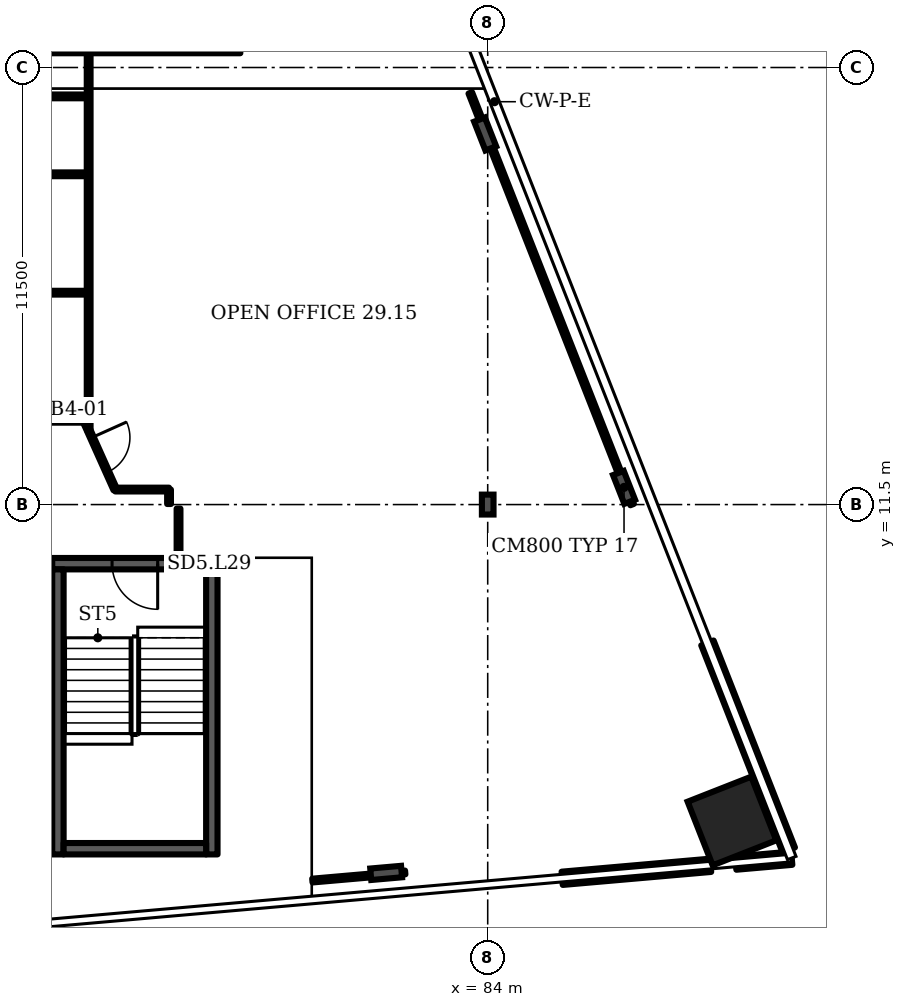
"""IFC4 building model, lengths in metres.
Left out: names, types, materials, properties, quantities, classifications, styles, units other than length and angle.
Written with IfcOpenShell. Run it as: python <this file> out.ifc"""

import sys

from ifc_helpers import new_model, si_unit, direction, frame, frame_2d, origin, origin_2d, place, context, subcontext, project, spatial, rectangle, i_section, extrude, element, fill, save


model = new_model("IFC4")
c1 = context("Model", 3, precision=1e-05, world=origin(), true_north=direction((0.0, 1.0)))
c2 = subcontext(c1, "Body", "Model", "MODEL_VIEW")
j1 = project(units=[si_unit("LENGTHUNIT", "METRE"), si_unit("PLANEANGLEUNIT", "RADIAN")], contexts=[c1])
p1 = place(None, origin())
s1 = spatial("IfcSite", under=j1, at=p1, CompositionType="ELEMENT")
p2 = place(p1, origin())
s2 = spatial("IfcBuilding", under=s1, at=p2, CompositionType="ELEMENT")
p3 = place(p2, frame((0.0, 0.0, 125.5)))
s3 = spatial("IfcBuildingStorey", under=s2, at=p3, CompositionType="ELEMENT", Elevation=125.5)
p4 = place(p3, frame((90.427, 3.174, 0.0), z_axis=(0.0, 0.0, 1.0), x_axis=(-0.365778, 0.930702, 0.0)))
e1 = element("IfcColumn", 1, at=p4, inside=s3, PredefinedType="COLUMN", context=c2, shape_type="SweptSolid", body=[
    extrude(rectangle(XDim=1.8, YDim=1.8, at=origin_2d()), origin(), (0.0, 0.0, 1.0), 3.6),
])
for number, where, z_axis, x_axis in (
    (2, (81.328, 1.808, 0.0), (0.0, 0.0, 1.0), (0.087, -0.996, 0.0)),
    (3, (87.587, 11.952, 0.0), (0.0, 0.0, 1.0), (0.931, 0.366, 0.0)),
    (4, (83.933, 21.251, 0.0), (0.0, 0.0, 1.0), (0.931, 0.366, 0.0)),
):
    element("IfcColumn", number, at=place(p3, frame(where, z_axis=z_axis, x_axis=x_axis)), inside=s3, PredefinedType="COLUMN", context=c2, shape_type="SweptSolid", body=[
        extrude(i_section(OverallWidth=0.303, OverallDepth=0.814, WebThickness=0.021, FlangeThickness=0.04, FilletRadius=0.03, at=origin_2d()), origin(), (0.0, 0.0, 1.0), 3.6),
    ])
p5 = place(p3, frame((84.0, 11.5, 0.0), z_axis=(0.0, 0.0, 1.0), x_axis=(1.0, 0.0, 0.0)))
e5 = element("IfcColumn", 5, at=p5, inside=s3, PredefinedType="COLUMN", context=c2, shape_type="SweptSolid", body=[
    extrude(i_section(OverallWidth=0.306, OverallDepth=0.524, WebThickness=0.021, FlangeThickness=0.04, FilletRadius=0.027, at=origin_2d()), origin(), (0.0, 0.0, 1.0), 3.6),
])
p6 = place(p3, frame((85.959, 1.667, 0.0), z_axis=(0.0, 0.0, 1.0), x_axis=(0.996194, 0.087167, 0.0)))
e6 = element("IfcWall", 6, at=p6, inside=s3, PredefinedType="SOLIDWALL", context=c2, shape_type="SweptSolid", body=[
    extrude(rectangle(XDim=3.921, YDim=0.35, at=frame_2d((1.96, 0.0))), origin(), (0.0, 0.0, 1.0), 1.0),
])
p7 = place(p3, frame((90.527, 2.066, 0.0), z_axis=(0.0, 0.0, 1.0), x_axis=(0.996198, 0.087157, 0.0)))
e7 = element("IfcWall", 7, at=p7, inside=s3, PredefinedType="SOLIDWALL", context=c2, shape_type="SweptSolid", body=[
    extrude(rectangle(XDim=1.479, YDim=0.35, at=frame_2d((0.74, 0.0))), origin(), (0.0, 0.0, 1.0), 1.0),
])
p8 = place(p3, frame((91.921, 2.414, 0.0), z_axis=(0.0, 0.0, 1.0), x_axis=(-0.36578, 0.930701, 0.0)))
e8 = element("IfcWall", 8, at=p8, inside=s3, PredefinedType="SOLIDWALL", context=c2, shape_type="SweptSolid", body=[
    extrude(rectangle(XDim=5.852, YDim=0.35, at=frame_2d((2.926, 0.0))), origin(), (0.0, 0.0, 1.0), 1.0),
])
p9 = place(p3, frame((72.541, 9.945, 0.0), z_axis=(0.0, 0.0, 1.0), x_axis=(1.0, 0.0, 0.0)))
e9 = element("IfcWall", 9, at=p9, inside=s3, PredefinedType="SHEAR", context=c2, shape_type="SweptSolid", body=[
    extrude(rectangle(XDim=4.35, YDim=0.3, at=frame_2d((2.175, 0.0))), origin(), (0.0, 0.0, 1.0), 3.2),
])
p10 = place(p9, frame((1.575, 0.0, 0.0)))
e10 = element("IfcOpeningElement", 10, at=p10, cuts=e9, PredefinedType="OPENING", context=c2, shape_type="SweptSolid", body=[
    extrude(rectangle(XDim=1.2, YDim=2.1, at=frame_2d((0.6, 1.05))), frame((0.0, 0.16, 0.0), z_axis=(0.0, -1.0, 0.0), x_axis=(1.0, 0.0, 0.0)), (0.0, 0.0, 1.0), 0.32),
])
p11 = place(p3, frame((65.91, 13.705, 0.0), z_axis=(0.0, 0.0, 1.0), x_axis=(1.0, 0.0, 0.0)))
e11 = element("IfcWall", 11, at=p11, inside=s3, PredefinedType="PARTITIONING", context=c2, shape_type="SweptSolid", body=[
    extrude(rectangle(XDim=7.49, YDim=0.1, at=frame_2d((3.745, 0.0))), origin(), (0.0, 0.0, 1.0), 3.2),
])
p12 = place(p3, frame((65.91, 22.24, 0.0), z_axis=(0.0, 0.0, 1.0), x_axis=(1.0, 0.0, 0.0)))
e12 = element("IfcWall", 12, at=p12, inside=s3, PredefinedType="PARTITIONING", context=c2, shape_type="SweptSolid", body=[
    extrude(rectangle(XDim=7.59, YDim=0.1, at=frame_2d((3.795, 0.0))), origin(), (0.0, 0.0, 1.0), 3.2),
])
for number, where, z_axis, x_axis in (
    (13, (67.71, 17.075, 0.0), (0.0, 0.0, 1.0), (1.0, 0.0, 0.0)),
    (14, (67.71, 20.19, 0.0), (0.0, 0.0, 1.0), (1.0, 0.0, 0.0)),
):
    element("IfcWall", number, at=place(p3, frame(where, z_axis=z_axis, x_axis=x_axis)), inside=s3, PredefinedType="PARTITIONING", context=c2, shape_type="SweptSolid", body=[
        extrude(rectangle(XDim=5.79, YDim=0.1, at=frame_2d((2.895, 0.0))), origin(), (0.0, 0.0, 1.0), 3.2),
    ])
p13 = place(p3, frame((73.49, 13.48, 0.0), z_axis=(0.0, 0.0, 1.0), x_axis=(-0.419275, 0.907861, 0.0)))
e15 = element("IfcWall", 15, at=p13, inside=s3, PredefinedType="PARTITIONING", context=c2, shape_type="SweptSolid", body=[
    extrude(rectangle(XDim=0.215, YDim=0.1, at=frame_2d((0.107, 0.0))), origin(), (0.0, 0.0, 1.0), 3.2),
])
p14 = place(p3, frame((73.5, 13.48, 0.0), z_axis=(0.0, 0.0, 1.0), x_axis=(0.0, 1.0, 0.0)))
e16 = element("IfcWall", 16, at=p14, inside=s3, PredefinedType="PARTITIONING", context=c2, shape_type="SweptSolid", body=[
    extrude(rectangle(XDim=9.895, YDim=0.1, at=frame_2d((4.948, 0.0))), origin(), (0.0, 0.0, 1.0), 3.2),
])
p15 = place(p3, frame((74.2, 11.895, 0.0), z_axis=(0.0, 0.0, 1.0), x_axis=(-0.409356, 0.912377, 0.0)))
e17 = element("IfcWall", 17, at=p15, inside=s3, PredefinedType="PARTITIONING", context=c2, shape_type="SweptSolid", body=[
    extrude(rectangle(XDim=1.71, YDim=0.1, at=frame_2d((0.855, 0.0))), origin(), (0.0, 0.0, 1.0), 3.2),
])
p16 = place(p15, frame((0.5, 0.0, 0.0)))
e18 = element("IfcOpeningElement", 18, at=p16, cuts=e17, PredefinedType="OPENING", context=c2, shape_type="SweptSolid", body=[
    extrude(rectangle(XDim=1.0, YDim=2.1, at=frame_2d((0.5, 1.05))), frame((0.0, 0.06, 0.0), z_axis=(0.0, -1.0, 0.0), x_axis=(1.0, 0.0, 0.0)), (0.0, 0.0, 1.0), 0.12),
])
p17 = place(p3, frame((74.2, 11.895, 0.0), z_axis=(0.0, 0.0, 1.0), x_axis=(1.0, 0.0, 0.0)))
e19 = element("IfcWall", 19, at=p17, inside=s3, PredefinedType="PARTITIONING", context=c2, shape_type="SweptSolid", body=[
    extrude(rectangle(XDim=1.415, YDim=0.1, at=frame_2d((0.708, 0.0))), origin(), (0.0, 0.0, 1.0), 3.2),
])
p18 = place(p3, frame((75.615, 11.515, 0.0), z_axis=(0.0, 0.0, 1.0), x_axis=(0.0, 1.0, 0.0)))
e20 = element("IfcWall", 20, at=p18, inside=s3, PredefinedType="PARTITIONING", context=c2, shape_type="SweptSolid", body=[
    extrude(rectangle(XDim=0.38, YDim=0.1, at=frame_2d((0.19, 0.0))), origin(), (0.0, 0.0, 1.0), 3.2),
])
p19 = place(p3, frame((75.865, 10.115, 0.0), z_axis=(0.0, 0.0, 1.0), x_axis=(0.0, 1.0, 0.0)))
e21 = element("IfcWall", 21, at=p19, inside=s3, PredefinedType="PARTITIONING", context=c2, shape_type="SweptSolid", body=[
    extrude(rectangle(XDim=1.28, YDim=0.1, at=frame_2d((0.64, 0.0))), origin(), (0.0, 0.0, 1.0), 3.2),
])
p20 = place(p3, frame((79.386, 1.607, 0.0), z_axis=(0.0, 0.0, 1.0), x_axis=(0.996209, 0.086973, 0.0)))
e22 = element("IfcWall", 22, at=p20, inside=s3, PredefinedType="PARTITIONING", context=c2, shape_type="SweptSolid", body=[
    extrude(rectangle(XDim=2.453, YDim=0.1, at=frame_2d((1.227, 0.0))), origin(), (0.0, 0.0, 1.0), 2.58),
])
p21 = place(p3, frame((87.8, 11.5, 0.0), z_axis=(0.0, 0.0, 1.0), x_axis=(-0.365866, 0.930668, 0.0)))
e23 = element("IfcWall", 23, at=p21, inside=s3, PredefinedType="PARTITIONING", context=c2, shape_type="SweptSolid", body=[
    extrude(rectangle(XDim=11.64, YDim=0.1, at=frame_2d((5.82, 0.0))), origin(), (0.0, 0.0, 1.0), 2.58),
])
for number, where, z_axis, x_axis in (
    (24, (72.691, 2.295, 0.0), (0.0, 0.0, 1.0), (0.0, 1.0, 0.0)),
    (25, (76.741, 2.295, 0.0), (0.0, 0.0, 1.0), (0.0, 1.0, 0.0)),
):
    element("IfcWall", number, at=place(p3, frame(where, z_axis=z_axis, x_axis=x_axis)), inside=s3, PredefinedType="SHEAR", context=c2, shape_type="SweptSolid", body=[
        extrude(rectangle(XDim=7.5, YDim=0.3, at=frame_2d((3.75, 0.0))), origin(), (0.0, 0.0, 1.0), 3.2),
    ])
p22 = place(p3, frame((72.841, 2.445, 0.0), z_axis=(0.0, 0.0, 1.0), x_axis=(1.0, 0.0, 0.0)))
e26 = element("IfcWall", 26, at=p22, inside=s3, PredefinedType="SHEAR", context=c2, shape_type="SweptSolid", body=[
    extrude(rectangle(XDim=3.75, YDim=0.3, at=frame_2d((1.875, 0.0))), origin(), (0.0, 0.0, 1.0), 3.2),
])
p23 = place(p3, frame((69.99, 23.525, 0.0), z_axis=(0.0, 0.0, 1.0), x_axis=(1.0, 0.0, 0.0)))
e27 = element("IfcWall", 27, at=p23, inside=s3, PredefinedType="SHEAR", context=c2, shape_type="SweptSolid", body=[
    extrude(rectangle(XDim=7.5, YDim=0.3, at=frame_2d((3.75, 0.0))), origin(), (0.0, 0.0, 1.0), 3.2),
])
p24 = place(p10, origin())
e28 = element("IfcDoor", 28, at=p24, inside=s3, OperationType="SINGLE_SWING_RIGHT", PredefinedType="DOOR", context=c2, shape_type="SweptSolid", body=[
    extrude(rectangle(XDim=1.2, YDim=2.1, at=frame_2d((0.6, 1.05))), frame((0.0, 0.025, 0.0), z_axis=(0.0, -1.0, 0.0), x_axis=(1.0, 0.0, 0.0)), (0.0, 0.0, 1.0), 0.05),
])
fill(e10, e28)
p25 = place(p16, origin())
e29 = element("IfcDoor", 29, at=p25, inside=s3, OperationType="SINGLE_SWING_RIGHT", PredefinedType="DOOR", context=c2, shape_type="SweptSolid", body=[
    extrude(rectangle(XDim=1.0, YDim=2.1, at=frame_2d((0.5, 1.05))), frame((0.0, 0.025, 0.0), z_axis=(0.0, -1.0, 0.0), x_axis=(1.0, 0.0, 0.0)), (0.0, 0.0, 1.0), 0.05),
])
fill(e18, e29)
save(model, sys.argv[1])
